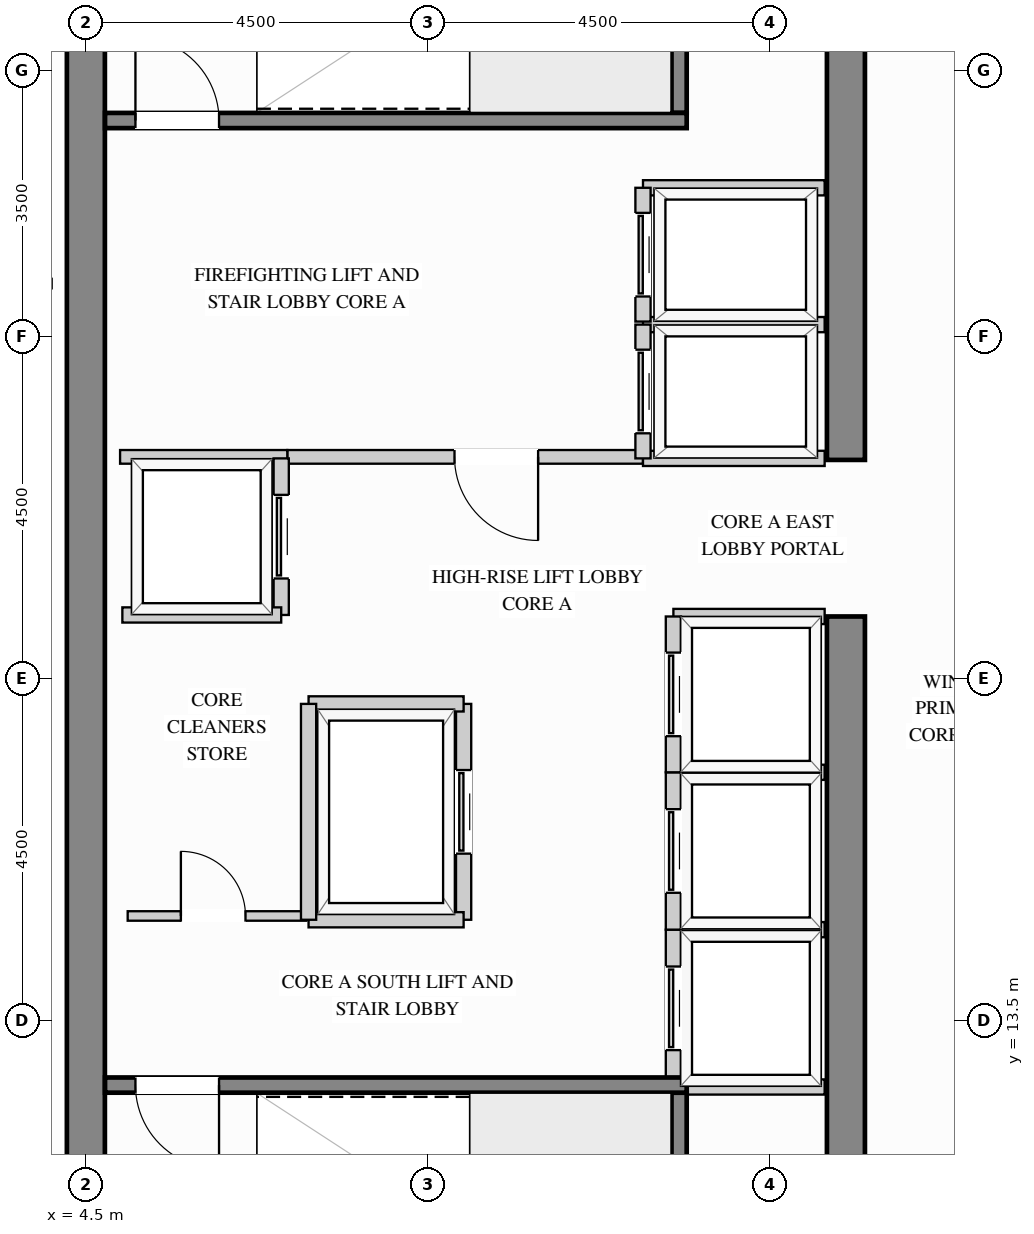
"""IFC4 building model, lengths in metres.
Left out: names, types, materials, properties, quantities, classifications, styles, units other than length and angle.
Written with IfcOpenShell. Run it as: python <this file> out.ifc"""

import sys

from ifc_helpers import new_model, si_unit, direction, frame, frame_2d, origin, place, context, subcontext, project, spatial, rectangle, extrude, source, transform, mapped, element, fill, save


model = new_model("IFC4")
c1 = context("Model", 3, precision=1e-05, world=origin(), true_north=direction((0.0, 1.0)))
c2 = subcontext(c1, "Body", "Model", "MODEL_VIEW")
j1 = project(units=[si_unit("LENGTHUNIT", "METRE"), si_unit("PLANEANGLEUNIT", "RADIAN")], contexts=[c1])
p1 = place(None, origin())
s1 = spatial("IfcSite", under=j1, at=p1, CompositionType="ELEMENT")
p2 = place(p1, origin())
s2 = spatial("IfcBuilding", under=s1, at=p2, CompositionType="ELEMENT")
p3 = place(p2, frame((0.0, 0.0, 244.8)))
s3 = spatial("IfcBuildingStorey", under=s2, at=p3, CompositionType="ELEMENT", Elevation=244.8)
m1 = source(origin(), c2, "Body", "SweptSolid", [
    extrude(rectangle(XDim=10.07, YDim=0.5, at=frame_2d((5.035, 0.0))), origin(), (0.0, 0.0, 1.0), 3.4),
])
p4 = place(p3, frame((14.5, 8.75, 0.0), z_axis=(0.0, 0.0, 1.0), x_axis=(0.0, 1.0, 0.0)))
e1 = element("IfcWall", 1, at=p4, inside=s3, PredefinedType="SHEAR", context=c2, shape_type="MappedRepresentation", body=[
    mapped(m1, transform((0.0, 0.0, 0.0), x_axis=(1.0, 0.0, 0.0), y_axis=(0.0, 1.0, 0.0), z_axis=(0.0, 0.0, 1.0))),
])
m2 = source(origin(), c2, "Body", "SweptSolid", [
    extrude(rectangle(XDim=8.37, YDim=0.5, at=frame_2d((4.185, 0.0))), origin(), (0.0, 0.0, 1.0), 3.4),
])
p5 = place(p3, frame((14.5, 20.88, 0.0), z_axis=(0.0, 0.0, 1.0), x_axis=(0.0, 1.0, 0.0)))
e2 = element("IfcWall", 2, at=p5, inside=s3, PredefinedType="SHEAR", context=c2, shape_type="MappedRepresentation", body=[
    mapped(m2, transform((0.0, 0.0, 0.0), x_axis=(1.0, 0.0, 0.0), y_axis=(0.0, 1.0, 0.0), z_axis=(0.0, 0.0, 1.0))),
])
m3 = source(origin(), c2, "Body", "SweptSolid", [
    extrude(rectangle(XDim=20.5, YDim=0.5, at=frame_2d((10.25, 0.0))), origin(), (0.0, 0.0, 1.0), 3.4),
])
p6 = place(p3, frame((4.5, 8.75, 0.0), z_axis=(0.0, 0.0, 1.0), x_axis=(0.0, 1.0, 0.0)))
e3 = element("IfcWall", 3, at=p6, inside=s3, PredefinedType="SHEAR", context=c2, shape_type="MappedRepresentation", body=[
    mapped(m3, transform((0.0, 0.0, 0.0), x_axis=(1.0, 0.0, 0.0), y_axis=(0.0, 1.0, 0.0), z_axis=(0.0, 0.0, 1.0))),
])
p7 = place(p3, frame((7.15, 20.92, 0.0), z_axis=(0.0, 0.0, 1.0), x_axis=(1.0, 0.0, 0.0)))
e4 = element("IfcWall", 4, at=p7, inside=s3, PredefinedType="PARTITIONING", context=c2, shape_type="SweptSolid", body=[
    extrude(rectangle(XDim=4.68, YDim=0.18, at=frame_2d((2.34, 0.0))), origin(), (0.0, 0.0, 1.0), 3.385),
])
p8 = place(p7, frame((2.2, 0.0, 0.0)))
e5 = element("IfcOpeningElement", 5, at=p8, cuts=e4, PredefinedType="OPENING", context=c2, shape_type="SweptSolid", body=[
    extrude(rectangle(XDim=1.1, YDim=2.15, at=frame_2d((0.55, 1.075))), frame((0.0, 0.1, 0.0), z_axis=(0.0, -1.0, 0.0), x_axis=(1.0, 0.0, 0.0)), (0.0, 0.0, 1.0), 0.2),
])
m4 = source(origin(), c2, "Body", "SweptSolid", [
    extrude(rectangle(XDim=2.2, YDim=0.18, at=frame_2d((1.1, 0.0))), origin(), (0.0, 0.0, 1.0), 3.385),
])
p9 = place(p3, frame((4.95, 20.92, 0.0), z_axis=(0.0, 0.0, 1.0), x_axis=(1.0, 0.0, 0.0)))
e6 = element("IfcWall", 6, at=p9, inside=s3, PredefinedType="PARTITIONING", context=c2, shape_type="MappedRepresentation", body=[
    mapped(m4, transform((0.0, 0.0, 0.0), x_axis=(1.0, 0.0, 0.0), y_axis=(0.0, 1.0, 0.0), z_axis=(0.0, 0.0, 1.0))),
])
p10 = place(p3, frame((5.05, 14.88, 0.0), z_axis=(0.0, 0.0, 1.0), x_axis=(1.0, 0.0, 0.0)))
e7 = element("IfcWall", 7, at=p10, inside=s3, PredefinedType="PARTITIONING", context=c2, shape_type="SweptSolid", body=[
    extrude(rectangle(XDim=2.35, YDim=0.125, at=frame_2d((1.175, 0.0))), origin(), (0.0, 0.0, 1.0), 3.385),
])
p11 = place(p10, frame((0.7, 0.0, 0.0)))
e8 = element("IfcOpeningElement", 8, at=p11, cuts=e7, PredefinedType="OPENING", context=c2, shape_type="SweptSolid", body=[
    extrude(rectangle(XDim=0.85, YDim=2.1, at=frame_2d((0.425, 1.05))), frame((0.0, 0.073, 0.0), z_axis=(0.0, -1.0, 0.0), x_axis=(1.0, 0.0, 0.0)), (0.0, 0.0, 1.0), 0.145),
])
m5 = source(origin(), c2, "Body", "SweptSolid", [
    extrude(rectangle(XDim=3.698, YDim=0.125, at=frame_2d((1.849, 0.0))), origin(), (0.0, 0.0, 1.0), 3.385),
])
p12 = place(p3, frame((0.352, 23.2, 0.0), z_axis=(0.0, 0.0, 1.0), x_axis=(1.0, 0.0, 0.0)))
e9 = element("IfcWall", 9, at=p12, inside=s3, PredefinedType="PARTITIONING", context=c2, shape_type="MappedRepresentation", body=[
    mapped(m5, transform((0.0, 0.0, 0.0), x_axis=(1.0, 0.0, 0.0), y_axis=(0.0, 1.0, 0.0), z_axis=(0.0, 0.0, 1.0))),
])
m6 = source(origin(), c2, "Body", "SweptSolid", [
    extrude(rectangle(XDim=2.39, YDim=0.2, at=frame_2d((1.195, 0.0))), origin(), (0.0, 0.0, 1.0), 3.385),
])
for number, where, z_axis, x_axis in (
    (10, (11.83, 22.66, 0.0), (0.0, 0.0, 1.0), (1.0, 0.0, 0.0)),
    (11, (11.83, 20.9, 0.0), (0.0, 0.0, 1.0), (1.0, 0.0, 0.0)),
):
    element("IfcWall", number, at=place(p3, frame(where, z_axis=z_axis, x_axis=x_axis)), inside=s3, PredefinedType="PARTITIONING", context=c2, shape_type="MappedRepresentation", body=[
        mapped(m6, transform((0.0, 0.0, 0.0), x_axis=(1.0, 0.0, 0.0), y_axis=(0.0, 1.0, 0.0), z_axis=(0.0, 0.0, 1.0))),
    ])
p13 = place(p3, frame((11.83, 20.9, 0.0), z_axis=(0.0, 0.0, 1.0), x_axis=(0.0, 1.0, 0.0)))
e12 = element("IfcWall", 12, at=p13, inside=s3, PredefinedType="PARTITIONING", context=c2, shape_type="SweptSolid", body=[
    extrude(rectangle(XDim=1.76, YDim=0.2, at=frame_2d((0.88, 0.0))), origin(), (0.0, 0.0, 1.0), 3.385),
])
p14 = place(p13, frame((0.33, 0.0, 0.0)))
e13 = element("IfcOpeningElement", 13, at=p14, cuts=e12, PredefinedType="OPENING", context=c2, shape_type="SweptSolid", body=[
    extrude(rectangle(XDim=1.1, YDim=2.2, at=frame_2d((0.55, 1.1))), frame((0.0, 0.11, 0.0), z_axis=(0.0, -1.0, 0.0), x_axis=(1.0, 0.0, 0.0)), (0.0, 0.0, 1.0), 0.22),
])
p15 = place(p3, frame((11.83, 24.46, 0.0), z_axis=(0.0, 0.0, 1.0), x_axis=(1.0, 0.0, 0.0)))
e14 = element("IfcWall", 14, at=p15, inside=s3, PredefinedType="PARTITIONING", context=c2, shape_type="MappedRepresentation", body=[
    mapped(m6, transform((0.0, 0.0, 0.0), x_axis=(1.0, 0.0, 0.0), y_axis=(0.0, 1.0, 0.0), z_axis=(0.0, 0.0, 1.0))),
])
p16 = place(p3, frame((11.83, 22.7, 0.0), z_axis=(0.0, 0.0, 1.0), x_axis=(0.0, 1.0, 0.0)))
e15 = element("IfcWall", 15, at=p16, inside=s3, PredefinedType="PARTITIONING", context=c2, shape_type="SweptSolid", body=[
    extrude(rectangle(XDim=1.76, YDim=0.2, at=frame_2d((0.88, 0.0))), origin(), (0.0, 0.0, 1.0), 3.385),
])
p17 = place(p16, frame((0.33, 0.0, 0.0)))
e16 = element("IfcOpeningElement", 16, at=p17, cuts=e15, PredefinedType="OPENING", context=c2, shape_type="SweptSolid", body=[
    extrude(rectangle(XDim=1.1, YDim=2.2, at=frame_2d((0.55, 1.1))), frame((0.0, 0.11, 0.0), z_axis=(0.0, -1.0, 0.0), x_axis=(1.0, 0.0, 0.0)), (0.0, 0.0, 1.0), 0.22),
])
m7 = source(origin(), c2, "Body", "SweptSolid", [
    extrude(rectangle(XDim=1.99, YDim=0.2, at=frame_2d((0.995, 0.0))), origin(), (0.0, 0.0, 1.0), 3.385),
])
for number, where, z_axis, x_axis in (
    (17, (12.23, 14.7, 0.0), (0.0, 0.0, 1.0), (1.0, 0.0, 0.0)),
    (18, (12.23, 12.63, 0.0), (0.0, 0.0, 1.0), (1.0, 0.0, 0.0)),
):
    element("IfcWall", number, at=place(p3, frame(where, z_axis=z_axis, x_axis=x_axis)), inside=s3, PredefinedType="PARTITIONING", context=c2, shape_type="MappedRepresentation", body=[
        mapped(m7, transform((0.0, 0.0, 0.0), x_axis=(1.0, 0.0, 0.0), y_axis=(0.0, 1.0, 0.0), z_axis=(0.0, 0.0, 1.0))),
    ])
p18 = place(p3, frame((12.23, 12.63, 0.0), z_axis=(0.0, 0.0, 1.0), x_axis=(0.0, 1.0, 0.0)))
e19 = element("IfcWall", 19, at=p18, inside=s3, PredefinedType="PARTITIONING", context=c2, shape_type="SweptSolid", body=[
    extrude(rectangle(XDim=2.07, YDim=0.2, at=frame_2d((1.035, 0.0))), origin(), (0.0, 0.0, 1.0), 3.385),
])
p19 = place(p18, frame((0.485, 0.0, 0.0)))
e20 = element("IfcOpeningElement", 20, at=p19, cuts=e19, PredefinedType="OPENING", context=c2, shape_type="SweptSolid", body=[
    extrude(rectangle(XDim=1.1, YDim=2.2, at=frame_2d((0.55, 1.1))), frame((0.0, 0.11, 0.0), z_axis=(0.0, -1.0, 0.0), x_axis=(1.0, 0.0, 0.0)), (0.0, 0.0, 1.0), 0.22),
])
p20 = place(p3, frame((12.23, 16.77, 0.0), z_axis=(0.0, 0.0, 1.0), x_axis=(1.0, 0.0, 0.0)))
e21 = element("IfcWall", 21, at=p20, inside=s3, PredefinedType="PARTITIONING", context=c2, shape_type="MappedRepresentation", body=[
    mapped(m7, transform((0.0, 0.0, 0.0), x_axis=(1.0, 0.0, 0.0), y_axis=(0.0, 1.0, 0.0), z_axis=(0.0, 0.0, 1.0))),
])
p21 = place(p3, frame((12.23, 14.7, 0.0), z_axis=(0.0, 0.0, 1.0), x_axis=(0.0, 1.0, 0.0)))
e22 = element("IfcWall", 22, at=p21, inside=s3, PredefinedType="PARTITIONING", context=c2, shape_type="SweptSolid", body=[
    extrude(rectangle(XDim=2.07, YDim=0.2, at=frame_2d((1.035, 0.0))), origin(), (0.0, 0.0, 1.0), 3.385),
])
p22 = place(p21, frame((0.485, 0.0, 0.0)))
e23 = element("IfcOpeningElement", 23, at=p22, cuts=e22, PredefinedType="OPENING", context=c2, shape_type="SweptSolid", body=[
    extrude(rectangle(XDim=1.1, YDim=2.2, at=frame_2d((0.55, 1.1))), frame((0.0, 0.11, 0.0), z_axis=(0.0, -1.0, 0.0), x_axis=(1.0, 0.0, 0.0)), (0.0, 0.0, 1.0), 0.22),
])
p23 = place(p3, frame((12.23, 18.82, 0.0), z_axis=(0.0, 0.0, 1.0), x_axis=(1.0, 0.0, 0.0)))
e24 = element("IfcWall", 24, at=p23, inside=s3, PredefinedType="PARTITIONING", context=c2, shape_type="MappedRepresentation", body=[
    mapped(m7, transform((0.0, 0.0, 0.0), x_axis=(1.0, 0.0, 0.0), y_axis=(0.0, 1.0, 0.0), z_axis=(0.0, 0.0, 1.0))),
])
p24 = place(p3, frame((12.23, 16.77, 0.0), z_axis=(0.0, 0.0, 1.0), x_axis=(0.0, 1.0, 0.0)))
e25 = element("IfcWall", 25, at=p24, inside=s3, PredefinedType="PARTITIONING", context=c2, shape_type="SweptSolid", body=[
    extrude(rectangle(XDim=2.05, YDim=0.2, at=frame_2d((1.025, 0.0))), origin(), (0.0, 0.0, 1.0), 3.385),
])
p25 = place(p24, frame((0.475, 0.0, 0.0)))
e26 = element("IfcOpeningElement", 26, at=p25, cuts=e25, PredefinedType="OPENING", context=c2, shape_type="SweptSolid", body=[
    extrude(rectangle(XDim=1.1, YDim=2.2, at=frame_2d((0.55, 1.1))), frame((0.0, 0.11, 0.0), z_axis=(0.0, -1.0, 0.0), x_axis=(1.0, 0.0, 0.0)), (0.0, 0.0, 1.0), 0.22),
])
p26 = place(p3, frame((7.07, 18.84, 0.0), z_axis=(0.0, 0.0, 1.0), x_axis=(0.0, 1.0, 0.0)))
e27 = element("IfcWall", 27, at=p26, inside=s3, PredefinedType="PARTITIONING", context=c2, shape_type="SweptSolid", body=[
    extrude(rectangle(XDim=2.06, YDim=0.2, at=frame_2d((1.03, 0.0))), origin(), (0.0, 0.0, 1.0), 3.385),
])
p27 = place(p26, frame((0.48, 0.0, 0.0)))
e28 = element("IfcOpeningElement", 28, at=p27, cuts=e27, PredefinedType="OPENING", context=c2, shape_type="SweptSolid", body=[
    extrude(rectangle(XDim=1.1, YDim=2.2, at=frame_2d((0.55, 1.1))), frame((0.0, 0.11, 0.0), z_axis=(0.0, -1.0, 0.0), x_axis=(1.0, 0.0, 0.0)), (0.0, 0.0, 1.0), 0.22),
])
m8 = source(origin(), c2, "Body", "SweptSolid", [
    extrude(rectangle(XDim=2.09, YDim=0.2, at=frame_2d((1.045, 0.0))), origin(), (0.0, 0.0, 1.0), 3.385),
])
p28 = place(p3, frame((4.98, 18.84, 0.0), z_axis=(0.0, 0.0, 1.0), x_axis=(1.0, 0.0, 0.0)))
e29 = element("IfcWall", 29, at=p28, inside=s3, PredefinedType="PARTITIONING", context=c2, shape_type="MappedRepresentation", body=[
    mapped(m8, transform((0.0, 0.0, 0.0), x_axis=(1.0, 0.0, 0.0), y_axis=(0.0, 1.0, 0.0), z_axis=(0.0, 0.0, 1.0))),
])
p29 = place(p3, frame((9.47, 14.83, 0.0), z_axis=(0.0, 0.0, 1.0), x_axis=(0.0, 1.0, 0.0)))
e30 = element("IfcWall", 30, at=p29, inside=s3, PredefinedType="PARTITIONING", context=c2, shape_type="SweptSolid", body=[
    extrude(rectangle(XDim=2.84, YDim=0.2, at=frame_2d((1.42, 0.0))), origin(), (0.0, 0.0, 1.0), 3.385),
])
p30 = place(p29, frame((0.87, 0.0, 0.0)))
e31 = element("IfcOpeningElement", 31, at=p30, cuts=e30, PredefinedType="OPENING", context=c2, shape_type="SweptSolid", body=[
    extrude(rectangle(XDim=1.1, YDim=2.2, at=frame_2d((0.55, 1.1))), frame((0.0, 0.11, 0.0), z_axis=(0.0, -1.0, 0.0), x_axis=(1.0, 0.0, 0.0)), (0.0, 0.0, 1.0), 0.22),
])
m9 = source(origin(), c2, "Body", "SweptSolid", [
    extrude(rectangle(XDim=2.04, YDim=0.2, at=frame_2d((1.02, 0.0))), origin(), (0.0, 0.0, 1.0), 3.385),
])
for number, where, z_axis, x_axis in (
    (32, (7.43, 17.67, 0.0), (0.0, 0.0, 1.0), (1.0, 0.0, 0.0)),
    (33, (7.43, 14.83, 0.0), (0.0, 0.0, 1.0), (1.0, 0.0, 0.0)),
):
    element("IfcWall", number, at=place(p3, frame(where, z_axis=z_axis, x_axis=x_axis)), inside=s3, PredefinedType="PARTITIONING", context=c2, shape_type="MappedRepresentation", body=[
        mapped(m9, transform((0.0, 0.0, 0.0), x_axis=(1.0, 0.0, 0.0), y_axis=(0.0, 1.0, 0.0), z_axis=(0.0, 0.0, 1.0))),
    ])
m10 = source(origin(), c2, "Body", "SweptSolid", [
    extrude(rectangle(XDim=2.84, YDim=0.2, at=frame_2d((1.42, 0.0))), origin(), (0.0, 0.0, 1.0), 3.385),
])
p31 = place(p3, frame((7.43, 14.83, 0.0), z_axis=(0.0, 0.0, 1.0), x_axis=(0.0, 1.0, 0.0)))
e34 = element("IfcWall", 34, at=p31, inside=s3, PredefinedType="PARTITIONING", context=c2, shape_type="MappedRepresentation", body=[
    mapped(m10, transform((0.0, 0.0, 0.0), x_axis=(1.0, 0.0, 0.0), y_axis=(0.0, 1.0, 0.0), z_axis=(0.0, 0.0, 1.0))),
])
m11 = source(origin(), c2, "Body", "SweptSolid", [
    extrude(rectangle(XDim=3.803, YDim=0.2, at=frame_2d((1.901, 0.0))), origin(), (0.0, 0.0, 1.0), 3.4),
])
p32 = place(p3, frame((12.305, 8.752, 0.0), z_axis=(0.0, 0.0, 1.0), x_axis=(0.0, 1.0, 0.0)))
e35 = element("IfcWall", 35, at=p32, inside=s3, PredefinedType="SHEAR", context=c2, shape_type="MappedRepresentation", body=[
    mapped(m11, transform((0.0, 0.0, 0.0), x_axis=(1.0, 0.0, 0.0), y_axis=(0.0, 1.0, 0.0), z_axis=(0.0, 0.0, 1.0))),
])
p33 = place(p3, frame((4.752, 12.655, 0.0), z_axis=(0.0, 0.0, 1.0), x_axis=(1.0, 0.0, 0.0)))
e36 = element("IfcWall", 36, at=p33, inside=s3, PredefinedType="SHEAR", context=c2, shape_type="SweptSolid", body=[
    extrude(rectangle(XDim=7.653, YDim=0.2, at=frame_2d((3.827, 0.0))), origin(), (0.0, 0.0, 1.0), 3.4),
])
p34 = place(p33, frame((0.4, 0.0, 0.0)))
e37 = element("IfcOpeningElement", 37, at=p34, cuts=e36, PredefinedType="OPENING", context=c2, shape_type="SweptSolid", body=[
    extrude(rectangle(XDim=1.1, YDim=2.15, at=frame_2d((0.55, 1.075))), frame((0.0, 0.11, 0.0), z_axis=(0.0, -1.0, 0.0), x_axis=(1.0, 0.0, 0.0)), (0.0, 0.0, 1.0), 0.22),
])
p35 = place(p3, frame((12.305, 25.445, 0.0), z_axis=(0.0, 0.0, 1.0), x_axis=(0.0, 1.0, 0.0)))
e38 = element("IfcWall", 38, at=p35, inside=s3, PredefinedType="SHEAR", context=c2, shape_type="MappedRepresentation", body=[
    mapped(m11, transform((0.0, 0.0, 0.0), x_axis=(1.0, 0.0, 0.0), y_axis=(0.0, 1.0, 0.0), z_axis=(0.0, 0.0, 1.0))),
])
p36 = place(p3, frame((4.752, 25.345, 0.0), z_axis=(0.0, 0.0, 1.0), x_axis=(1.0, 0.0, 0.0)))
e39 = element("IfcWall", 39, at=p36, inside=s3, PredefinedType="SHEAR", context=c2, shape_type="SweptSolid", body=[
    extrude(rectangle(XDim=7.653, YDim=0.2, at=frame_2d((3.827, 0.0))), origin(), (0.0, 0.0, 1.0), 3.4),
])
p37 = place(p36, frame((0.4, 0.0, 0.0)))
e40 = element("IfcOpeningElement", 40, at=p37, cuts=e39, PredefinedType="OPENING", context=c2, shape_type="SweptSolid", body=[
    extrude(rectangle(XDim=1.1, YDim=2.15, at=frame_2d((0.55, 1.075))), frame((0.0, 0.11, 0.0), z_axis=(0.0, -1.0, 0.0), x_axis=(1.0, 0.0, 0.0)), (0.0, 0.0, 1.0), 0.22),
])
m12 = source(origin(), c2, "Body", "SweptSolid", [
    extrude(rectangle(XDim=1.1, YDim=2.15, at=frame_2d((0.55, 1.075))), frame((0.0, 0.025, 0.0), z_axis=(0.0, -1.0, 0.0), x_axis=(1.0, 0.0, 0.0)), (0.0, 0.0, 1.0), 0.05),
])
p38 = place(p8, origin())
e41 = element("IfcDoor", 41, at=p38, inside=s3, OperationType="SINGLE_SWING_RIGHT", PredefinedType="DOOR", context=c2, shape_type="MappedRepresentation", body=[
    mapped(m12, transform((0.0, 0.0, 0.0), x_axis=(1.0, 0.0, 0.0), y_axis=(0.0, 1.0, 0.0), z_axis=(0.0, 0.0, 1.0))),
])
fill(e5, e41)
m13 = source(origin(), c2, "Body", "SweptSolid", [
    extrude(rectangle(XDim=1.1, YDim=2.2, at=frame_2d((0.55, 1.1))), frame((0.0, 0.025, 0.0), z_axis=(0.0, -1.0, 0.0), x_axis=(1.0, 0.0, 0.0)), (0.0, 0.0, 1.0), 0.05),
])
p39 = place(p14, origin())
e42 = element("IfcDoor", 42, at=p39, inside=s3, OperationType="SLIDING_TO_LEFT", PredefinedType="DOOR", context=c2, shape_type="MappedRepresentation", body=[
    mapped(m13, transform((0.0, 0.0, 0.0), x_axis=(1.0, 0.0, 0.0), y_axis=(0.0, 1.0, 0.0), z_axis=(0.0, 0.0, 1.0))),
])
fill(e13, e42)
p40 = place(p17, origin())
e43 = element("IfcDoor", 43, at=p40, inside=s3, OperationType="SLIDING_TO_LEFT", PredefinedType="DOOR", context=c2, shape_type="MappedRepresentation", body=[
    mapped(m13, transform((0.0, 0.0, 0.0), x_axis=(1.0, 0.0, 0.0), y_axis=(0.0, 1.0, 0.0), z_axis=(0.0, 0.0, 1.0))),
])
fill(e16, e43)
p41 = place(p19, origin())
e44 = element("IfcDoor", 44, at=p41, inside=s3, OperationType="SLIDING_TO_LEFT", PredefinedType="DOOR", context=c2, shape_type="MappedRepresentation", body=[
    mapped(m13, transform((0.0, 0.0, 0.0), x_axis=(1.0, 0.0, 0.0), y_axis=(0.0, 1.0, 0.0), z_axis=(0.0, 0.0, 1.0))),
])
fill(e20, e44)
p42 = place(p22, origin())
e45 = element("IfcDoor", 45, at=p42, inside=s3, OperationType="SLIDING_TO_LEFT", PredefinedType="DOOR", context=c2, shape_type="MappedRepresentation", body=[
    mapped(m13, transform((0.0, 0.0, 0.0), x_axis=(1.0, 0.0, 0.0), y_axis=(0.0, 1.0, 0.0), z_axis=(0.0, 0.0, 1.0))),
])
fill(e23, e45)
p43 = place(p25, origin())
e46 = element("IfcDoor", 46, at=p43, inside=s3, OperationType="SLIDING_TO_LEFT", PredefinedType="DOOR", context=c2, shape_type="MappedRepresentation", body=[
    mapped(m13, transform((0.0, 0.0, 0.0), x_axis=(1.0, 0.0, 0.0), y_axis=(0.0, 1.0, 0.0), z_axis=(0.0, 0.0, 1.0))),
])
fill(e26, e46)
p44 = place(p27, origin())
e47 = element("IfcDoor", 47, at=p44, inside=s3, OperationType="SLIDING_TO_LEFT", PredefinedType="DOOR", context=c2, shape_type="MappedRepresentation", body=[
    mapped(m13, transform((0.0, 0.0, 0.0), x_axis=(1.0, 0.0, 0.0), y_axis=(0.0, 1.0, 0.0), z_axis=(0.0, 0.0, 1.0))),
])
fill(e28, e47)
p45 = place(p30, origin())
e48 = element("IfcDoor", 48, at=p45, inside=s3, OperationType="SLIDING_TO_LEFT", PredefinedType="DOOR", context=c2, shape_type="MappedRepresentation", body=[
    mapped(m13, transform((0.0, 0.0, 0.0), x_axis=(1.0, 0.0, 0.0), y_axis=(0.0, 1.0, 0.0), z_axis=(0.0, 0.0, 1.0))),
])
fill(e31, e48)
m14 = source(origin(), c2, "Body", "SweptSolid", [
    extrude(rectangle(XDim=0.85, YDim=2.1, at=frame_2d((0.425, 1.05))), frame((0.0, 0.025, 0.0), z_axis=(0.0, -1.0, 0.0), x_axis=(1.0, 0.0, 0.0)), (0.0, 0.0, 1.0), 0.05),
])
p46 = place(p11, origin())
e49 = element("IfcDoor", 49, at=p46, inside=s3, OperationType="SINGLE_SWING_LEFT", PredefinedType="DOOR", context=c2, shape_type="MappedRepresentation", body=[
    mapped(m14, transform((0.0, 0.0, 0.0), x_axis=(1.0, 0.0, 0.0), y_axis=(0.0, 1.0, 0.0), z_axis=(0.0, 0.0, 1.0))),
])
fill(e8, e49)
m15 = source(origin(), c2, "Body", "SweptSolid", [
    extrude(rectangle(XDim=1.1, YDim=2.15, at=frame_2d((0.55, 1.075))), frame((0.0, 0.025, 0.0), z_axis=(0.0, -1.0, 0.0), x_axis=(1.0, 0.0, 0.0)), (0.0, 0.0, 1.0), 0.05),
])
p47 = place(p34, origin())
e50 = element("IfcDoor", 50, at=p47, inside=s3, OperationType="SINGLE_SWING_RIGHT", PredefinedType="DOOR", context=c2, shape_type="MappedRepresentation", body=[
    mapped(m15, transform((0.0, 0.0, 0.0), x_axis=(1.0, 0.0, 0.0), y_axis=(0.0, 1.0, 0.0), z_axis=(0.0, 0.0, 1.0))),
])
fill(e37, e50)
p48 = place(p37, origin())
e51 = element("IfcDoor", 51, at=p48, inside=s3, OperationType="SINGLE_SWING_LEFT", PredefinedType="DOOR", context=c2, shape_type="MappedRepresentation", body=[
    mapped(m15, transform((0.0, 0.0, 0.0), x_axis=(1.0, 0.0, 0.0), y_axis=(0.0, 1.0, 0.0), z_axis=(0.0, 0.0, 1.0))),
])
fill(e40, e51)
save(model, sys.argv[1])
